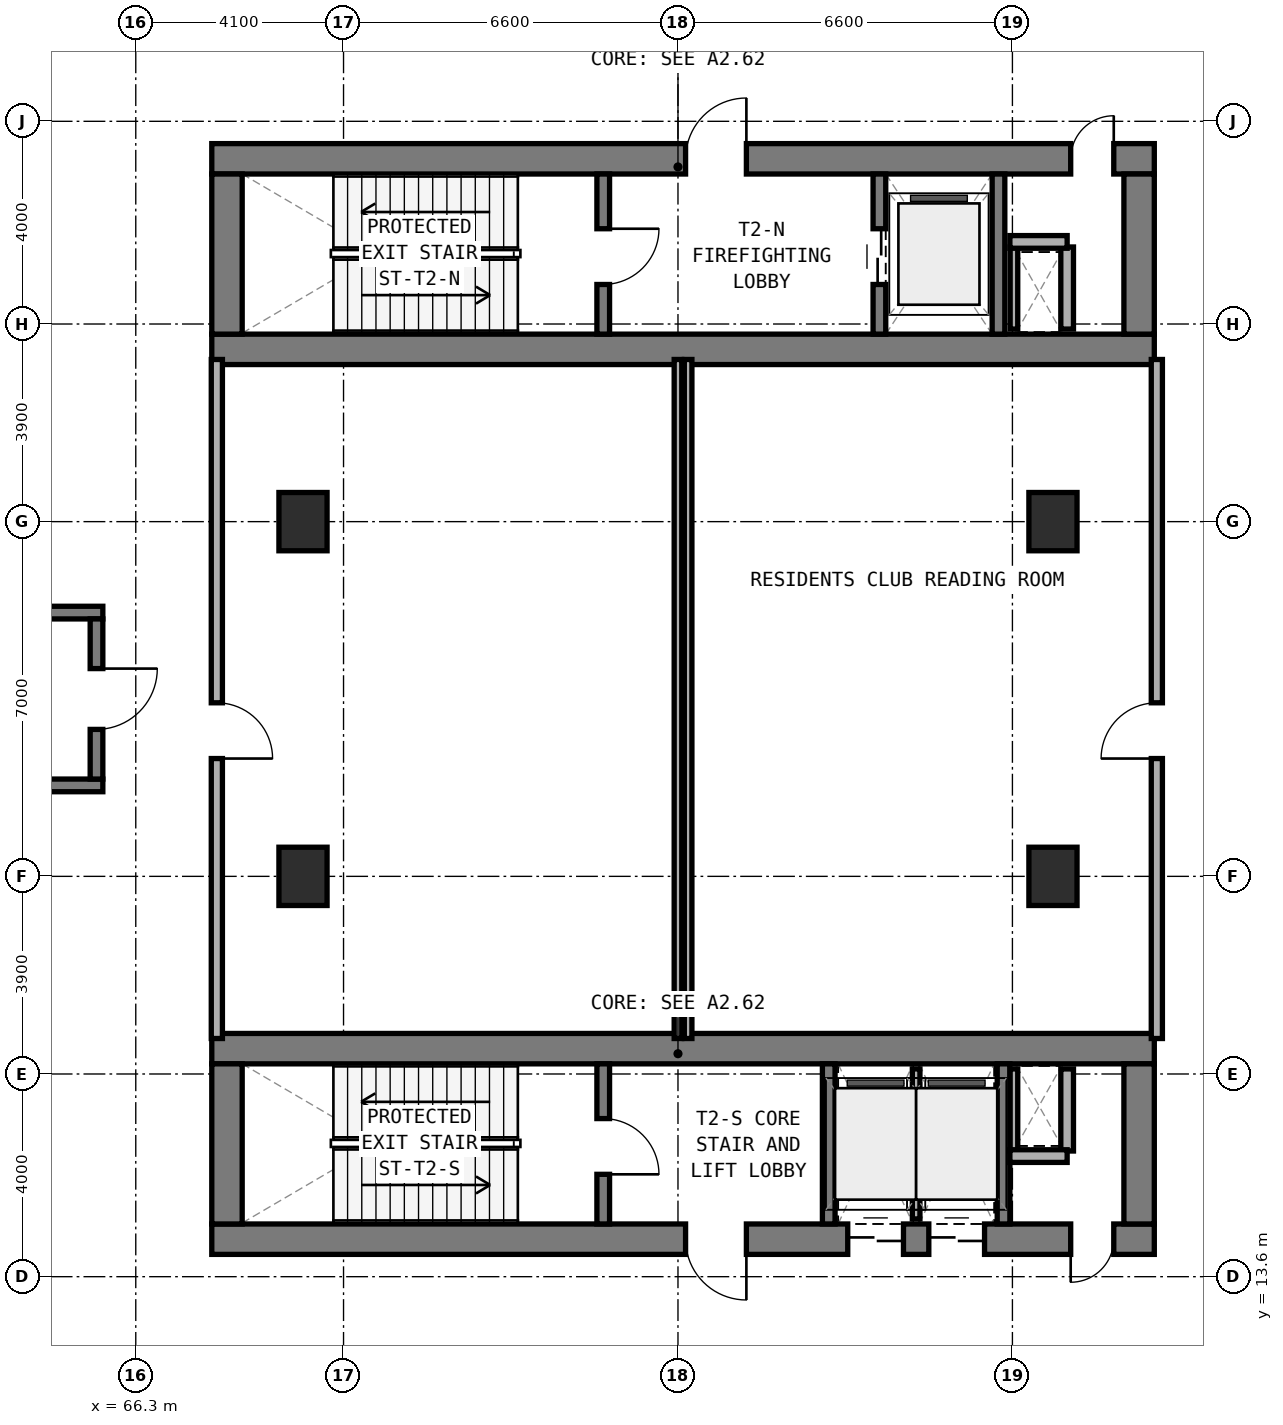
"""IFC4 building model, lengths in metres.
Left out: names, types, materials, properties, quantities, classifications, styles, units other than length and angle.
Written with IfcOpenShell. Run it as: python <this file> out.ifc"""

import sys

from ifc_helpers import new_model, si_unit, direction, frame, frame_2d, origin, origin_2d, place, context, subcontext, project, spatial, rectangle, extrude, element, fill, save


model = new_model("IFC4")
c1 = context("Model", 3, precision=1e-05, world=origin(), true_north=direction((0.0, 1.0)))
c2 = subcontext(c1, "Body", "Model", "MODEL_VIEW")
j1 = project(units=[si_unit("LENGTHUNIT", "METRE"), si_unit("PLANEANGLEUNIT", "RADIAN")], contexts=[c1])
p1 = place(None, origin())
s1 = spatial("IfcSite", under=j1, at=p1, CompositionType="ELEMENT")
p2 = place(p1, origin())
s2 = spatial("IfcBuilding", under=s1, at=p2, CompositionType="ELEMENT")
p3 = place(p2, frame((0.0, 0.0, 5.4)))
s3 = spatial("IfcBuildingStorey", under=s2, at=p3, CompositionType="ELEMENT", Elevation=5.4)
p4 = place(p3, frame((67.8, 31.9, 0.0), z_axis=(0.0, 0.0, 1.0), x_axis=(1.0, 0.0, 0.0)))
e1 = element("IfcWall", 1, at=p4, inside=s3, PredefinedType="SHEAR", context=c2, shape_type="SweptSolid", body=[
    extrude(rectangle(XDim=18.6, YDim=0.6, at=frame_2d((9.3, 0.0))), origin(), (0.0, 0.0, 1.0), 4.8),
])
p5 = place(p3, frame((67.8, 35.66, 0.0), z_axis=(0.0, 0.0, 1.0), x_axis=(1.0, 0.0, 0.0)))
e2 = element("IfcWall", 2, at=p5, inside=s3, PredefinedType="SHEAR", context=c2, shape_type="SweptSolid", body=[
    extrude(rectangle(XDim=18.6, YDim=0.6, at=frame_2d((9.3, 0.0))), origin(), (0.0, 0.0, 1.0), 4.8),
])
p6 = place(p5, frame((9.35, 0.0, 0.0)))
e3 = element("IfcOpeningElement", 3, at=p6, cuts=e2, PredefinedType="OPENING", context=c2, shape_type="SweptSolid", body=[
    extrude(rectangle(XDim=1.2, YDim=2.15, at=frame_2d((0.6, 1.075))), frame((0.0, 0.31, 0.0), z_axis=(0.0, -1.0, 0.0), x_axis=(1.0, 0.0, 0.0)), (0.0, 0.0, 1.0), 0.62),
])
p7 = place(p5, frame((16.95, 0.0, 0.0)))
e4 = element("IfcOpeningElement", 4, at=p7, cuts=e2, PredefinedType="OPENING", context=c2, shape_type="SweptSolid", body=[
    extrude(rectangle(XDim=0.85, YDim=2.1, at=frame_2d((0.425, 1.05))), frame((0.0, 0.31, 0.0), z_axis=(0.0, -1.0, 0.0), x_axis=(1.0, 0.0, 0.0)), (0.0, 0.0, 1.0), 0.62),
])
for number, where, z_axis, x_axis in (
    (5, (68.1, 32.2, 0.0), (0.0, 0.0, 1.0), (0.0, 1.0, 0.0)),
    (6, (86.1, 32.2, 0.0), (0.0, 0.0, 1.0), (0.0, 1.0, 0.0)),
):
    element("IfcWall", number, at=place(p3, frame(where, z_axis=z_axis, x_axis=x_axis)), inside=s3, PredefinedType="SHEAR", context=c2, shape_type="SweptSolid", body=[
        extrude(rectangle(XDim=3.16, YDim=0.6, at=frame_2d((1.58, 0.0))), origin(), (0.0, 0.0, 1.0), 4.8),
    ])
p8 = place(p3, frame((75.525, 32.2, 0.0), z_axis=(0.0, 0.0, 1.0), x_axis=(0.0, 1.0, 0.0)))
e7 = element("IfcWall", 7, at=p8, inside=s3, PredefinedType="STANDARD", context=c2, shape_type="SweptSolid", body=[
    extrude(rectangle(XDim=3.16, YDim=0.25, at=frame_2d((1.58, 0.0))), origin(), (0.0, 0.0, 1.0), 4.45),
])
p9 = place(p8, frame((0.98, 0.0, 0.0)))
e8 = element("IfcOpeningElement", 8, at=p9, cuts=e7, PredefinedType="OPENING", context=c2, shape_type="SweptSolid", body=[
    extrude(rectangle(XDim=1.1, YDim=2.15, at=frame_2d((0.55, 1.075))), frame((0.0, 0.135, 0.0), z_axis=(0.0, -1.0, 0.0), x_axis=(1.0, 0.0, 0.0)), (0.0, 0.0, 1.0), 0.27),
])
p10 = place(p3, frame((80.975, 32.2, 0.0), z_axis=(0.0, 0.0, 1.0), x_axis=(0.0, 1.0, 0.0)))
e9 = element("IfcWall", 9, at=p10, inside=s3, PredefinedType="STANDARD", context=c2, shape_type="SweptSolid", body=[
    extrude(rectangle(XDim=3.16, YDim=0.25, at=frame_2d((1.58, 0.0))), origin(), (0.0, 0.0, 1.0), 4.45),
])
p11 = place(p10, frame((0.98, 0.0, 0.0)))
e10 = element("IfcOpeningElement", 10, at=p11, cuts=e9, PredefinedType="OPENING", context=c2, shape_type="SweptSolid", body=[
    extrude(rectangle(XDim=1.1, YDim=2.15, at=frame_2d((0.55, 1.075))), frame((0.0, 0.135, 0.0), z_axis=(0.0, -1.0, 0.0), x_axis=(1.0, 0.0, 0.0)), (0.0, 0.0, 1.0), 0.27),
])
p12 = place(p3, frame((83.325, 32.2, 0.0), z_axis=(0.0, 0.0, 1.0), x_axis=(0.0, 1.0, 0.0)))
e11 = element("IfcWall", 11, at=p12, inside=s3, PredefinedType="STANDARD", context=c2, shape_type="SweptSolid", body=[
    extrude(rectangle(XDim=3.16, YDim=0.25, at=frame_2d((1.58, 0.0))), origin(), (0.0, 0.0, 1.0), 4.45),
])
p13 = place(p3, frame((67.8, 14.34, 0.0), z_axis=(0.0, 0.0, 1.0), x_axis=(1.0, 0.0, 0.0)))
e12 = element("IfcWall", 12, at=p13, inside=s3, PredefinedType="SHEAR", context=c2, shape_type="SweptSolid", body=[
    extrude(rectangle(XDim=18.6, YDim=0.6, at=frame_2d((9.3, 0.0))), origin(), (0.0, 0.0, 1.0), 4.8),
])
p14 = place(p13, frame((9.35, 0.0, 0.0)))
e13 = element("IfcOpeningElement", 13, at=p14, cuts=e12, PredefinedType="OPENING", context=c2, shape_type="SweptSolid", body=[
    extrude(rectangle(XDim=1.2, YDim=2.15, at=frame_2d((0.6, 1.075))), frame((0.0, 0.31, 0.0), z_axis=(0.0, -1.0, 0.0), x_axis=(1.0, 0.0, 0.0)), (0.0, 0.0, 1.0), 0.62),
])
p15 = place(p13, frame((16.95, 0.0, 0.0)))
e14 = element("IfcOpeningElement", 14, at=p15, cuts=e12, PredefinedType="OPENING", context=c2, shape_type="SweptSolid", body=[
    extrude(rectangle(XDim=0.85, YDim=2.1, at=frame_2d((0.425, 1.05))), frame((0.0, 0.31, 0.0), z_axis=(0.0, -1.0, 0.0), x_axis=(1.0, 0.0, 0.0)), (0.0, 0.0, 1.0), 0.62),
])
p16 = place(p13, frame((12.55, 0.0, 0.0)))
e15 = element("IfcOpeningElement", 15, at=p16, cuts=e12, PredefinedType="OPENING", context=c2, shape_type="SweptSolid", body=[
    extrude(rectangle(XDim=1.1, YDim=2.15, at=frame_2d((0.55, 1.075))), frame((0.0, 0.31, 0.0), z_axis=(0.0, -1.0, 0.0), x_axis=(1.0, 0.0, 0.0)), (0.0, 0.0, 1.0), 0.62),
])
p17 = place(p13, frame((14.15, 0.0, 0.0)))
e16 = element("IfcOpeningElement", 16, at=p17, cuts=e12, PredefinedType="OPENING", context=c2, shape_type="SweptSolid", body=[
    extrude(rectangle(XDim=1.1, YDim=2.15, at=frame_2d((0.55, 1.075))), frame((0.0, 0.31, 0.0), z_axis=(0.0, -1.0, 0.0), x_axis=(1.0, 0.0, 0.0)), (0.0, 0.0, 1.0), 0.62),
])
p18 = place(p3, frame((67.8, 18.1, 0.0), z_axis=(0.0, 0.0, 1.0), x_axis=(1.0, 0.0, 0.0)))
e17 = element("IfcWall", 17, at=p18, inside=s3, PredefinedType="SHEAR", context=c2, shape_type="SweptSolid", body=[
    extrude(rectangle(XDim=18.6, YDim=0.6, at=frame_2d((9.3, 0.0))), origin(), (0.0, 0.0, 1.0), 4.8),
])
for number, where, z_axis, x_axis in (
    (18, (68.1, 14.64, 0.0), (0.0, 0.0, 1.0), (0.0, 1.0, 0.0)),
    (19, (86.1, 14.64, 0.0), (0.0, 0.0, 1.0), (0.0, 1.0, 0.0)),
):
    element("IfcWall", number, at=place(p3, frame(where, z_axis=z_axis, x_axis=x_axis)), inside=s3, PredefinedType="SHEAR", context=c2, shape_type="SweptSolid", body=[
        extrude(rectangle(XDim=3.16, YDim=0.6, at=frame_2d((1.58, 0.0))), origin(), (0.0, 0.0, 1.0), 4.8),
    ])
p19 = place(p3, frame((75.525, 14.64, 0.0), z_axis=(0.0, 0.0, 1.0), x_axis=(0.0, 1.0, 0.0)))
e20 = element("IfcWall", 20, at=p19, inside=s3, PredefinedType="STANDARD", context=c2, shape_type="SweptSolid", body=[
    extrude(rectangle(XDim=3.16, YDim=0.25, at=frame_2d((1.58, 0.0))), origin(), (0.0, 0.0, 1.0), 4.45),
])
p20 = place(p19, frame((0.98, 0.0, 0.0)))
e21 = element("IfcOpeningElement", 21, at=p20, cuts=e20, PredefinedType="OPENING", context=c2, shape_type="SweptSolid", body=[
    extrude(rectangle(XDim=1.1, YDim=2.15, at=frame_2d((0.55, 1.075))), frame((0.0, 0.135, 0.0), z_axis=(0.0, -1.0, 0.0), x_axis=(1.0, 0.0, 0.0)), (0.0, 0.0, 1.0), 0.27),
])
for number, where, z_axis, x_axis in (
    (22, (79.975, 14.64, 0.0), (0.0, 0.0, 1.0), (0.0, 1.0, 0.0)),
    (23, (83.425, 14.64, 0.0), (0.0, 0.0, 1.0), (0.0, 1.0, 0.0)),
):
    element("IfcWall", number, at=place(p3, frame(where, z_axis=z_axis, x_axis=x_axis)), inside=s3, PredefinedType="STANDARD", context=c2, shape_type="SweptSolid", body=[
        extrude(rectangle(XDim=3.16, YDim=0.25, at=frame_2d((1.58, 0.0))), origin(), (0.0, 0.0, 1.0), 4.45),
    ])
for number, where, z_axis, x_axis in (
    (24, (58.15, 23.295, 0.0), (0.0, 0.0, 1.0), (1.0, 0.0, 0.0)),
    (25, (58.15, 26.705, 0.0), (0.0, 0.0, 1.0), (1.0, 0.0, 0.0)),
):
    element("IfcWall", number, at=place(p3, frame(where, z_axis=z_axis, x_axis=x_axis)), inside=s3, PredefinedType="STANDARD", context=c2, shape_type="SweptSolid", body=[
        extrude(rectangle(XDim=7.5, YDim=0.25, at=frame_2d((3.75, 0.0))), origin(), (0.0, 0.0, 1.0), 4.8),
    ])
p21 = place(p3, frame((65.525, 23.42, 0.0), z_axis=(0.0, 0.0, 1.0), x_axis=(0.0, 1.0, 0.0)))
e26 = element("IfcWall", 26, at=p21, inside=s3, PredefinedType="STANDARD", context=c2, shape_type="SweptSolid", body=[
    extrude(rectangle(XDim=3.16, YDim=0.25, at=frame_2d((1.58, 0.0))), origin(), (0.0, 0.0, 1.0), 4.8),
])
p22 = place(p21, frame((0.98, 0.0, 0.0)))
e27 = element("IfcOpeningElement", 27, at=p22, cuts=e26, PredefinedType="OPENING", context=c2, shape_type="SweptSolid", body=[
    extrude(rectangle(XDim=1.2, YDim=2.15, at=frame_2d((0.6, 1.075))), frame((0.0, 0.135, 0.0), z_axis=(0.0, -1.0, 0.0), x_axis=(1.0, 0.0, 0.0)), (0.0, 0.0, 1.0), 0.27),
])
for number, where, z_axis, x_axis in (
    (28, (69.6, 21.5, 0.0), (0.0, 0.0, 1.0), (1.0, 0.0, 0.0)),
    (29, (69.6, 28.5, 0.0), (0.0, 0.0, 1.0), (1.0, 0.0, 0.0)),
    (30, (84.4, 21.5, 0.0), (0.0, 0.0, 1.0), (1.0, 0.0, 0.0)),
    (31, (84.4, 28.5, 0.0), (0.0, 0.0, 1.0), (1.0, 0.0, 0.0)),
):
    element("IfcColumn", number, at=place(p3, frame(where, z_axis=z_axis, x_axis=x_axis)), inside=s3, PredefinedType="COLUMN", context=c2, shape_type="SweptSolid", body=[
        extrude(rectangle(XDim=0.95, YDim=1.15, at=origin_2d()), origin(), (0.0, 0.0, 1.0), 4.8),
    ])
p23 = place(p3, frame((83.63, 32.3, 0.0), z_axis=(0.0, 0.0, 1.0), x_axis=(0.0, 1.0, 0.0)))
e32 = element("IfcWall", 32, at=p23, inside=s3, PredefinedType="PARTITIONING", context=c2, shape_type="SweptSolid", body=[
    extrude(rectangle(XDim=1.62, YDim=0.15, at=frame_2d((0.81, 0.0))), origin(), (0.0, 0.0, 1.0), 3.925),
])
p24 = place(p3, frame((84.68, 32.3, 0.0), z_axis=(0.0, 0.0, 1.0), x_axis=(0.0, 1.0, 0.0)))
e33 = element("IfcWall", 33, at=p24, inside=s3, PredefinedType="SOLIDWALL", context=c2, shape_type="SweptSolid", body=[
    extrude(rectangle(XDim=1.62, YDim=0.25, at=frame_2d((0.81, 0.0))), origin(), (0.0, 0.0, 1.0), 4.45),
])
p25 = place(p3, frame((83.55, 34.02, 0.0), z_axis=(0.0, 0.0, 1.0), x_axis=(1.0, 0.0, 0.0)))
e34 = element("IfcWall", 34, at=p25, inside=s3, PredefinedType="SOLIDWALL", context=c2, shape_type="SweptSolid", body=[
    extrude(rectangle(XDim=1.13, YDim=0.25, at=frame_2d((0.565, 0.0))), origin(), (0.0, 0.0, 1.0), 4.45),
])
p26 = place(p3, frame((83.63, 16.08, 0.0), z_axis=(0.0, 0.0, 1.0), x_axis=(0.0, 1.0, 0.0)))
e35 = element("IfcWall", 35, at=p26, inside=s3, PredefinedType="PARTITIONING", context=c2, shape_type="SweptSolid", body=[
    extrude(rectangle(XDim=1.62, YDim=0.15, at=frame_2d((0.81, 0.0))), origin(), (0.0, 0.0, 1.0), 3.925),
])
p27 = place(p3, frame((84.68, 16.08, 0.0), z_axis=(0.0, 0.0, 1.0), x_axis=(0.0, 1.0, 0.0)))
e36 = element("IfcWall", 36, at=p27, inside=s3, PredefinedType="SOLIDWALL", context=c2, shape_type="SweptSolid", body=[
    extrude(rectangle(XDim=1.62, YDim=0.25, at=frame_2d((0.81, 0.0))), origin(), (0.0, 0.0, 1.0), 4.45),
])
p28 = place(p3, frame((83.55, 15.98, 0.0), z_axis=(0.0, 0.0, 1.0), x_axis=(1.0, 0.0, 0.0)))
e37 = element("IfcWall", 37, at=p28, inside=s3, PredefinedType="SOLIDWALL", context=c2, shape_type="SweptSolid", body=[
    extrude(rectangle(XDim=1.13, YDim=0.25, at=frame_2d((0.565, 0.0))), origin(), (0.0, 0.0, 1.0), 4.45),
])
p29 = place(p3, frame((81.7, 14.74, 0.0), z_axis=(0.0, 0.0, 1.0), x_axis=(0.0, 1.0, 0.0)))
e38 = element("IfcWall", 38, at=p29, inside=s3, PredefinedType="PARTITIONING", context=c2, shape_type="SweptSolid", body=[
    extrude(rectangle(XDim=2.96, YDim=0.15, at=frame_2d((1.48, 0.0))), origin(), (0.0, 0.0, 1.0), 4.45),
])
p30 = place(p3, frame((77.0, 18.3, 0.0), z_axis=(0.0, 0.0, 1.0), x_axis=(0.0, 1.0, 0.0)))
e39 = element("IfcWall", 39, at=p30, inside=s3, PredefinedType="PARTITIONING", context=c2, shape_type="SweptSolid", body=[
    extrude(rectangle(XDim=13.4, YDim=0.15, at=frame_2d((6.7, 0.0))), origin(), (0.0, 0.0, 1.0), 3.625),
])
p31 = place(p3, frame((67.9, 18.3, 0.0), z_axis=(0.0, 0.0, 1.0), x_axis=(0.0, 1.0, 0.0)))
e40 = element("IfcWall", 40, at=p31, inside=s3, PredefinedType="SOLIDWALL", context=c2, shape_type="SweptSolid", body=[
    extrude(rectangle(XDim=13.4, YDim=0.22, at=frame_2d((6.7, 0.0))), origin(), (0.0, 0.0, 1.0), 3.925),
])
p32 = place(p31, frame((5.525, 0.0, 0.0)))
e41 = element("IfcOpeningElement", 41, at=p32, cuts=e40, PredefinedType="OPENING", context=c2, shape_type="SweptSolid", body=[
    extrude(rectangle(XDim=1.1, YDim=2.1, at=frame_2d((0.55, 1.05))), frame((0.0, 0.12, 0.0), z_axis=(0.0, -1.0, 0.0), x_axis=(1.0, 0.0, 0.0)), (0.0, 0.0, 1.0), 0.24),
])
p33 = place(p3, frame((77.2, 18.3, 0.0), z_axis=(0.0, 0.0, 1.0), x_axis=(0.0, 1.0, 0.0)))
e42 = element("IfcWall", 42, at=p33, inside=s3, PredefinedType="PARTITIONING", context=c2, shape_type="SweptSolid", body=[
    extrude(rectangle(XDim=13.4, YDim=0.15, at=frame_2d((6.7, 0.0))), origin(), (0.0, 0.0, 1.0), 3.625),
])
p34 = place(p3, frame((86.45, 18.3, 0.0), z_axis=(0.0, 0.0, 1.0), x_axis=(0.0, 1.0, 0.0)))
e43 = element("IfcWall", 43, at=p34, inside=s3, PredefinedType="SOLIDWALL", context=c2, shape_type="SweptSolid", body=[
    extrude(rectangle(XDim=13.4, YDim=0.22, at=frame_2d((6.7, 0.0))), origin(), (0.0, 0.0, 1.0), 3.925),
])
p35 = place(p34, frame((5.525, 0.0, 0.0)))
e44 = element("IfcOpeningElement", 44, at=p35, cuts=e43, PredefinedType="OPENING", context=c2, shape_type="SweptSolid", body=[
    extrude(rectangle(XDim=1.1, YDim=2.1, at=frame_2d((0.55, 1.05))), frame((0.0, 0.12, 0.0), z_axis=(0.0, -1.0, 0.0), x_axis=(1.0, 0.0, 0.0)), (0.0, 0.0, 1.0), 0.24),
])
p36 = place(p9, frame((1.1, 0.0, 0.0), z_axis=(0.0, 0.0, 1.0), x_axis=(-1.0, 0.0, 0.0)))
e45 = element("IfcDoor", 45, at=p36, inside=s3, OperationType="SINGLE_SWING_LEFT", PredefinedType="DOOR", context=c2, shape_type="SweptSolid", body=[
    extrude(rectangle(XDim=1.1, YDim=2.15, at=frame_2d((0.55, 1.075))), frame((0.0, 0.025, 0.0), z_axis=(0.0, -1.0, 0.0), x_axis=(1.0, 0.0, 0.0)), (0.0, 0.0, 1.0), 0.05),
])
fill(e8, e45)
p37 = place(p6, origin())
e46 = element("IfcDoor", 46, at=p37, inside=s3, OperationType="SINGLE_SWING_RIGHT", PredefinedType="DOOR", context=c2, shape_type="SweptSolid", body=[
    extrude(rectangle(XDim=1.2, YDim=2.15, at=frame_2d((0.6, 1.075))), frame((0.0, 0.025, 0.0), z_axis=(0.0, -1.0, 0.0), x_axis=(1.0, 0.0, 0.0)), (0.0, 0.0, 1.0), 0.05),
])
fill(e3, e46)
p38 = place(p11, origin())
e47 = element("IfcDoor", 47, at=p38, inside=s3, OperationType="DOUBLE_DOOR_SLIDING", PredefinedType="DOOR", context=c2, shape_type="SweptSolid", body=[
    extrude(rectangle(XDim=1.1, YDim=2.15, at=frame_2d((0.55, 1.075))), frame((0.0, 0.025, 0.0), z_axis=(0.0, -1.0, 0.0), x_axis=(1.0, 0.0, 0.0)), (0.0, 0.0, 1.0), 0.05),
])
fill(e10, e47)
p39 = place(p7, origin())
e48 = element("IfcDoor", 48, at=p39, inside=s3, OperationType="SINGLE_SWING_RIGHT", PredefinedType="DOOR", context=c2, shape_type="SweptSolid", body=[
    extrude(rectangle(XDim=0.85, YDim=2.1, at=frame_2d((0.425, 1.05))), frame((0.0, 0.025, 0.0), z_axis=(0.0, -1.0, 0.0), x_axis=(1.0, 0.0, 0.0)), (0.0, 0.0, 1.0), 0.05),
])
fill(e4, e48)
p40 = place(p20, frame((1.1, 0.0, 0.0), z_axis=(0.0, 0.0, 1.0), x_axis=(-1.0, 0.0, 0.0)))
e49 = element("IfcDoor", 49, at=p40, inside=s3, OperationType="SINGLE_SWING_RIGHT", PredefinedType="DOOR", context=c2, shape_type="SweptSolid", body=[
    extrude(rectangle(XDim=1.1, YDim=2.15, at=frame_2d((0.55, 1.075))), frame((0.0, 0.025, 0.0), z_axis=(0.0, -1.0, 0.0), x_axis=(1.0, 0.0, 0.0)), (0.0, 0.0, 1.0), 0.05),
])
fill(e21, e49)
p41 = place(p14, frame((1.2, 0.0, 0.0), z_axis=(0.0, 0.0, 1.0), x_axis=(-1.0, 0.0, 0.0)))
e50 = element("IfcDoor", 50, at=p41, inside=s3, OperationType="SINGLE_SWING_LEFT", PredefinedType="DOOR", context=c2, shape_type="SweptSolid", body=[
    extrude(rectangle(XDim=1.2, YDim=2.15, at=frame_2d((0.6, 1.075))), frame((0.0, 0.025, 0.0), z_axis=(0.0, -1.0, 0.0), x_axis=(1.0, 0.0, 0.0)), (0.0, 0.0, 1.0), 0.05),
])
fill(e13, e50)
p42 = place(p15, frame((0.85, 0.0, 0.0), z_axis=(0.0, 0.0, 1.0), x_axis=(-1.0, 0.0, 0.0)))
e51 = element("IfcDoor", 51, at=p42, inside=s3, OperationType="SINGLE_SWING_RIGHT", PredefinedType="DOOR", context=c2, shape_type="SweptSolid", body=[
    extrude(rectangle(XDim=0.85, YDim=2.1, at=frame_2d((0.425, 1.05))), frame((0.0, 0.025, 0.0), z_axis=(0.0, -1.0, 0.0), x_axis=(1.0, 0.0, 0.0)), (0.0, 0.0, 1.0), 0.05),
])
fill(e14, e51)
p43 = place(p16, frame((1.1, 0.0, 0.0), z_axis=(0.0, 0.0, 1.0), x_axis=(-1.0, 0.0, 0.0)))
e52 = element("IfcDoor", 52, at=p43, inside=s3, OperationType="DOUBLE_DOOR_SLIDING", PredefinedType="DOOR", context=c2, shape_type="SweptSolid", body=[
    extrude(rectangle(XDim=1.1, YDim=2.15, at=frame_2d((0.55, 1.075))), frame((0.0, 0.025, 0.0), z_axis=(0.0, -1.0, 0.0), x_axis=(1.0, 0.0, 0.0)), (0.0, 0.0, 1.0), 0.05),
])
fill(e15, e52)
p44 = place(p17, frame((1.1, 0.0, 0.0), z_axis=(0.0, 0.0, 1.0), x_axis=(-1.0, 0.0, 0.0)))
e53 = element("IfcDoor", 53, at=p44, inside=s3, OperationType="DOUBLE_DOOR_SLIDING", PredefinedType="DOOR", context=c2, shape_type="SweptSolid", body=[
    extrude(rectangle(XDim=1.1, YDim=2.15, at=frame_2d((0.55, 1.075))), frame((0.0, 0.025, 0.0), z_axis=(0.0, -1.0, 0.0), x_axis=(1.0, 0.0, 0.0)), (0.0, 0.0, 1.0), 0.05),
])
fill(e16, e53)
p45 = place(p22, frame((1.2, 0.0, 0.0), z_axis=(0.0, 0.0, 1.0), x_axis=(-1.0, 0.0, 0.0)))
e54 = element("IfcDoor", 54, at=p45, inside=s3, OperationType="SINGLE_SWING_LEFT", PredefinedType="DOOR", context=c2, shape_type="SweptSolid", body=[
    extrude(rectangle(XDim=1.2, YDim=2.15, at=frame_2d((0.6, 1.075))), frame((0.0, 0.025, 0.0), z_axis=(0.0, -1.0, 0.0), x_axis=(1.0, 0.0, 0.0)), (0.0, 0.0, 1.0), 0.05),
])
fill(e27, e54)
p46 = place(p32, frame((1.1, 0.0, 0.0), z_axis=(0.0, 0.0, 1.0), x_axis=(-1.0, 0.0, 0.0)))
e55 = element("IfcDoor", 55, at=p46, inside=s3, OperationType="SINGLE_SWING_RIGHT", PredefinedType="DOOR", context=c2, shape_type="SweptSolid", body=[
    extrude(rectangle(XDim=1.1, YDim=2.1, at=frame_2d((0.55, 1.05))), frame((0.0, 0.025, 0.0), z_axis=(0.0, -1.0, 0.0), x_axis=(1.0, 0.0, 0.0)), (0.0, 0.0, 1.0), 0.05),
])
fill(e41, e55)
p47 = place(p35, origin())
e56 = element("IfcDoor", 56, at=p47, inside=s3, OperationType="SINGLE_SWING_LEFT", PredefinedType="DOOR", context=c2, shape_type="SweptSolid", body=[
    extrude(rectangle(XDim=1.1, YDim=2.1, at=frame_2d((0.55, 1.05))), frame((0.0, 0.025, 0.0), z_axis=(0.0, -1.0, 0.0), x_axis=(1.0, 0.0, 0.0)), (0.0, 0.0, 1.0), 0.05),
])
fill(e44, e56)
save(model, sys.argv[1])
